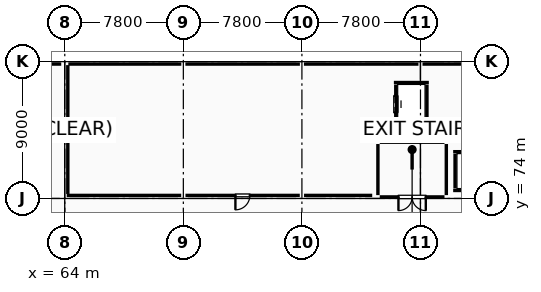
"""IFC4 building model, lengths in metres.
Left out: names, types, materials, properties, quantities, classifications, styles, units other than length and angle.
Written with IfcOpenShell. Run it as: python <this file> out.ifc"""

import sys

from ifc_helpers import new_model, si_unit, direction, frame, frame_2d, origin, origin_2d, place, context, subcontext, project, spatial, rectangle, hollow_rectangle, i_section, extrude, element, fill, save


model = new_model("IFC4")
c1 = context("Model", 3, precision=1e-05, world=origin(), true_north=direction((0.0, 1.0)))
c2 = subcontext(c1, "Body", "Model", "MODEL_VIEW")
j1 = project(units=[si_unit("LENGTHUNIT", "METRE"), si_unit("PLANEANGLEUNIT", "RADIAN")], contexts=[c1])
p1 = place(None, origin())
s1 = spatial("IfcSite", under=j1, at=p1, CompositionType="ELEMENT")
p2 = place(p1, origin())
s2 = spatial("IfcBuilding", under=s1, at=p2, CompositionType="ELEMENT")
p3 = place(p2, origin())
s3 = spatial("IfcBuildingStorey", under=s2, at=p3, CompositionType="ELEMENT", Elevation=0.0)
p4 = place(p3, frame((64.0, 74.0, 0.0), z_axis=(0.0, 0.0, 1.0), x_axis=(1.0, 0.0, 0.0)))
e1 = element("IfcColumn", 1, at=p4, inside=s3, PredefinedType="COLUMN", context=c2, shape_type="SweptSolid", body=[
    extrude(i_section(OverallWidth=0.25, OverallDepth=0.45, WebThickness=0.011, FlangeThickness=0.014, FilletRadius=0.015, at=origin_2d()), origin(), (0.0, 0.0, 1.0), 5.4),
])
p5 = place(p3, frame((64.0, 83.0, 0.0), z_axis=(0.0, 0.0, 1.0), x_axis=(1.0, 0.0, 0.0)))
e2 = element("IfcColumn", 2, at=p5, inside=s3, PredefinedType="COLUMN", context=c2, shape_type="SweptSolid", body=[
    extrude(hollow_rectangle(XDim=0.45, YDim=0.45, WallThickness=0.02, at=origin_2d()), origin(), (0.0, 0.0, 1.0), 5.4),
])
for number, where, z_axis, x_axis in (
    (3, (71.8, 74.0, 0.0), (0.0, 0.0, 1.0), (1.0, 0.0, 0.0)),
    (4, (71.8, 83.0, 0.0), (0.0, 0.0, 1.0), (1.0, 0.0, 0.0)),
    (5, (79.6, 74.0, 0.0), (0.0, 0.0, 1.0), (1.0, 0.0, 0.0)),
    (6, (79.6, 83.0, 0.0), (0.0, 0.0, 1.0), (1.0, 0.0, 0.0)),
    (7, (87.4, 83.0, 0.0), (0.0, 0.0, 1.0), (1.0, 0.0, 0.0)),
):
    element("IfcColumn", number, at=place(p3, frame(where, z_axis=z_axis, x_axis=x_axis)), inside=s3, PredefinedType="COLUMN", context=c2, shape_type="SweptSolid", body=[
        extrude(i_section(OverallWidth=0.25, OverallDepth=0.45, WebThickness=0.011, FlangeThickness=0.014, FilletRadius=0.015, at=origin_2d()), origin(), (0.0, 0.0, 1.0), 5.4),
    ])
p6 = place(p3, frame((62.804, 82.84, 0.0), z_axis=(0.0, 0.0, 1.0), x_axis=(1.0, 0.0, 0.0)))
e8 = element("IfcWall", 8, at=p6, inside=s3, PredefinedType="STANDARD", context=c2, shape_type="SweptSolid", body=[
    extrude(rectangle(XDim=0.963, YDim=0.28, at=frame_2d((0.481, 0.0))), origin(), (0.0, 0.0, 1.0), 5.12),
])
p7 = place(p3, frame((64.233, 82.84, 0.0), z_axis=(0.0, 0.0, 1.0), x_axis=(1.0, 0.0, 0.0)))
e9 = element("IfcWall", 9, at=p7, inside=s3, PredefinedType="STANDARD", context=c2, shape_type="SweptSolid", body=[
    extrude(rectangle(XDim=7.434, YDim=0.28, at=frame_2d((3.717, 0.0))), origin(), (0.0, 0.0, 1.0), 4.505),
])
p8 = place(p3, frame((71.933, 82.84, 0.0), z_axis=(0.0, 0.0, 1.0), x_axis=(1.0, 0.0, 0.0)))
e10 = element("IfcWall", 10, at=p8, inside=s3, PredefinedType="STANDARD", context=c2, shape_type="SweptSolid", body=[
    extrude(rectangle(XDim=7.534, YDim=0.28, at=frame_2d((3.767, 0.0))), origin(), (0.0, 0.0, 1.0), 4.555),
])
p9 = place(p3, frame((79.733, 82.84, 0.0), z_axis=(0.0, 0.0, 1.0), x_axis=(1.0, 0.0, 0.0)))
e11 = element("IfcWall", 11, at=p9, inside=s3, PredefinedType="STANDARD", context=c2, shape_type="SweptSolid", body=[
    extrude(rectangle(XDim=7.534, YDim=0.28, at=frame_2d((3.767, 0.0))), origin(), (0.0, 0.0, 1.0), 4.605),
])
p10 = place(p3, frame((87.533, 82.84, 0.0), z_axis=(0.0, 0.0, 1.0), x_axis=(1.0, 0.0, 0.0)))
e12 = element("IfcWall", 12, at=p10, inside=s3, PredefinedType="STANDARD", context=c2, shape_type="SweptSolid", body=[
    extrude(rectangle(XDim=5.863, YDim=0.28, at=frame_2d((2.932, 0.0))), origin(), (0.0, 0.0, 1.0), 5.12),
])
p11 = place(p3, frame((89.55, 74.525, 0.0), z_axis=(0.0, 0.0, 1.0), x_axis=(1.0, 0.0, 0.0)))
e13 = element("IfcWall", 13, at=p11, inside=s3, PredefinedType="STANDARD", context=c2, shape_type="SweptSolid", body=[
    extrude(rectangle(XDim=2.5, YDim=0.25, at=frame_2d((1.25, 0.0))), origin(), (0.0, 0.0, 1.0), 5.11),
])
p12 = place(p11, frame((0.65, 0.0, 0.0)))
e14 = element("IfcOpeningElement", 14, at=p12, cuts=e13, PredefinedType="OPENING", context=c2, shape_type="SweptSolid", body=[
    extrude(rectangle(XDim=1.2, YDim=2.05, at=frame_2d((0.6, 1.025))), frame((0.0, 0.135, 0.0), z_axis=(0.0, -1.0, 0.0), x_axis=(1.0, 0.0, 0.0)), (0.0, 0.0, 1.0), 0.27),
])
p13 = place(p3, frame((92.05, 77.075, 0.0), z_axis=(0.0, 0.0, 1.0), x_axis=(-1.0, 0.0, 0.0)))
e15 = element("IfcWall", 15, at=p13, inside=s3, PredefinedType="STANDARD", context=c2, shape_type="SweptSolid", body=[
    extrude(rectangle(XDim=2.5, YDim=0.25, at=frame_2d((1.25, 0.0))), origin(), (0.0, 0.0, 1.0), 5.11),
])
p14 = place(p3, frame((89.675, 76.94, 0.0), z_axis=(0.0, 0.0, 1.0), x_axis=(0.0, -1.0, 0.0)))
e16 = element("IfcWall", 16, at=p14, inside=s3, PredefinedType="STANDARD", context=c2, shape_type="SweptSolid", body=[
    extrude(rectangle(XDim=2.28, YDim=0.25, at=frame_2d((1.14, 0.0))), origin(), (0.0, 0.0, 1.0), 5.11),
])
for number, where, z_axis, x_axis in (
    (17, (85.65, 78.775, 0.0), (0.0, 0.0, 1.0), (1.0, 0.0, 0.0)),
    (18, (87.95, 81.625, 0.0), (0.0, 0.0, 1.0), (-1.0, 0.0, 0.0)),
):
    element("IfcWall", number, at=place(p3, frame(where, z_axis=z_axis, x_axis=x_axis)), inside=s3, PredefinedType="STANDARD", context=c2, shape_type="SweptSolid", body=[
        extrude(rectangle(XDim=2.3, YDim=0.25, at=frame_2d((1.15, 0.0))), origin(), (0.0, 0.0, 1.0), 5.11),
    ])
p15 = place(p3, frame((87.825, 78.91, 0.0), z_axis=(0.0, 0.0, 1.0), x_axis=(0.0, 1.0, 0.0)))
e19 = element("IfcWall", 19, at=p15, inside=s3, PredefinedType="STANDARD", context=c2, shape_type="SweptSolid", body=[
    extrude(rectangle(XDim=2.58, YDim=0.25, at=frame_2d((1.29, 0.0))), origin(), (0.0, 0.0, 1.0), 5.11),
])
p16 = place(p3, frame((85.775, 81.49, 0.0), z_axis=(0.0, 0.0, 1.0), x_axis=(0.0, -1.0, 0.0)))
e20 = element("IfcWall", 20, at=p16, inside=s3, PredefinedType="STANDARD", context=c2, shape_type="SweptSolid", body=[
    extrude(rectangle(XDim=2.58, YDim=0.25, at=frame_2d((1.29, 0.0))), origin(), (0.0, 0.0, 1.0), 5.11),
])
p17 = place(p16, frame((0.74, 0.0, 0.0)))
e21 = element("IfcOpeningElement", 21, at=p17, cuts=e20, PredefinedType="OPENING", context=c2, shape_type="SweptSolid", body=[
    extrude(rectangle(XDim=1.1, YDim=2.15, at=frame_2d((0.55, 1.075))), frame((0.0, 0.135, 0.0), z_axis=(0.0, -1.0, 0.0), x_axis=(1.0, 0.0, 0.0)), (0.0, 0.0, 1.0), 0.27),
])
p18 = place(p3, frame((84.6, 74.22, 0.0), z_axis=(0.0, 0.0, 1.0), x_axis=(0.0, 1.0, 0.0)))
e22 = element("IfcWall", 22, at=p18, inside=s3, PredefinedType="PARTITIONING", context=c2, shape_type="SweptSolid", body=[
    extrude(rectangle(XDim=3.36, YDim=0.2, at=frame_2d((1.68, 0.0))), origin(), (0.0, 0.0, 1.0), 5.11),
])
p19 = place(p3, frame((84.72, 77.7, 0.0), z_axis=(0.0, 0.0, 1.0), x_axis=(1.0, 0.0, 0.0)))
e23 = element("IfcWall", 23, at=p19, inside=s3, PredefinedType="PARTITIONING", context=c2, shape_type="SweptSolid", body=[
    extrude(rectangle(XDim=4.26, YDim=0.2, at=frame_2d((2.13, 0.0))), origin(), (0.0, 0.0, 1.0), 5.11),
])
p20 = place(p3, frame((89.1, 77.58, 0.0), z_axis=(0.0, 0.0, 1.0), x_axis=(0.0, -1.0, 0.0)))
e24 = element("IfcWall", 24, at=p20, inside=s3, PredefinedType="PARTITIONING", context=c2, shape_type="SweptSolid", body=[
    extrude(rectangle(XDim=3.36, YDim=0.2, at=frame_2d((1.68, 0.0))), origin(), (0.0, 0.0, 1.0), 5.11),
])
p21 = place(p3, frame((88.98, 74.1, 0.0), z_axis=(0.0, 0.0, 1.0), x_axis=(-1.0, 0.0, 0.0)))
e25 = element("IfcWall", 25, at=p21, inside=s3, PredefinedType="PARTITIONING", context=c2, shape_type="SweptSolid", body=[
    extrude(rectangle(XDim=4.26, YDim=0.2, at=frame_2d((2.13, 0.0))), origin(), (0.0, 0.0, 1.0), 5.11),
])
p22 = place(p21, frame((1.23, 0.0, 0.0)))
e26 = element("IfcOpeningElement", 26, at=p22, cuts=e25, PredefinedType="OPENING", context=c2, shape_type="SweptSolid", body=[
    extrude(rectangle(XDim=1.8, YDim=2.15, at=frame_2d((0.9, 1.075))), frame((0.0, 0.11, 0.0), z_axis=(0.0, -1.0, 0.0), x_axis=(1.0, 0.0, 0.0)), (0.0, 0.0, 1.0), 0.22),
])
p23 = place(p3, frame((64.2, 74.295, 0.0), z_axis=(0.0, 0.0, 1.0), x_axis=(0.0, 1.0, 0.0)))
e27 = element("IfcWall", 27, at=p23, inside=s3, PredefinedType="PARTITIONING", context=c2, shape_type="SweptSolid", body=[
    extrude(rectangle(XDim=8.476, YDim=0.15, at=frame_2d((4.238, 0.0))), origin(), (0.0, 0.0, 1.0), 4.1),
])
p24 = place(p3, frame((84.225, 74.2, 0.0), z_axis=(0.0, 0.0, 1.0), x_axis=(-1.0, 0.0, 0.0)))
e28 = element("IfcWall", 28, at=p24, inside=s3, PredefinedType="PARTITIONING", context=c2, shape_type="SweptSolid", body=[
    extrude(rectangle(XDim=4.485, YDim=0.15, at=frame_2d((2.243, 0.0))), origin(), (0.0, 0.0, 1.0), 5.11),
])
p25 = place(p3, frame((79.46, 74.2, 0.0), z_axis=(0.0, 0.0, 1.0), x_axis=(-1.0, 0.0, 0.0)))
e29 = element("IfcWall", 29, at=p25, inside=s3, PredefinedType="PARTITIONING", context=c2, shape_type="SweptSolid", body=[
    extrude(rectangle(XDim=7.52, YDim=0.15, at=frame_2d((3.76, 0.0))), origin(), (0.0, 0.0, 1.0), 4.75),
])
p26 = place(p25, frame((3.285, 0.0, 0.0)))
e30 = element("IfcOpeningElement", 30, at=p26, cuts=e29, PredefinedType="OPENING", context=c2, shape_type="SweptSolid", body=[
    extrude(rectangle(XDim=0.95, YDim=2.15, at=frame_2d((0.475, 1.075))), frame((0.0, 0.085, 0.0), z_axis=(0.0, -1.0, 0.0), x_axis=(1.0, 0.0, 0.0)), (0.0, 0.0, 1.0), 0.17),
])
p27 = place(p3, frame((71.66, 74.2, 0.0), z_axis=(0.0, 0.0, 1.0), x_axis=(-1.0, 0.0, 0.0)))
e31 = element("IfcWall", 31, at=p27, inside=s3, PredefinedType="PARTITIONING", context=c2, shape_type="SweptSolid", body=[
    extrude(rectangle(XDim=7.531, YDim=0.15, at=frame_2d((3.766, 0.0))), origin(), (0.0, 0.0, 1.0), 4.7),
])
p28 = place(p17, origin())
e32 = element("IfcDoor", 32, at=p28, inside=s3, OperationType="DOUBLE_DOOR_SLIDING", PredefinedType="DOOR", context=c2, shape_type="SweptSolid", body=[
    extrude(rectangle(XDim=1.1, YDim=2.15, at=frame_2d((0.55, 1.075))), frame((0.0, 0.025, 0.0), z_axis=(0.0, -1.0, 0.0), x_axis=(1.0, 0.0, 0.0)), (0.0, 0.0, 1.0), 0.05),
])
fill(e21, e32)
p29 = place(p22, origin())
e33 = element("IfcDoor", 33, at=p29, inside=s3, OperationType="DOUBLE_DOOR_SINGLE_SWING", PredefinedType="DOOR", context=c2, shape_type="SweptSolid", body=[
    extrude(rectangle(XDim=1.8, YDim=2.15, at=frame_2d((0.9, 1.075))), frame((0.0, 0.025, 0.0), z_axis=(0.0, -1.0, 0.0), x_axis=(1.0, 0.0, 0.0)), (0.0, 0.0, 1.0), 0.05),
])
fill(e26, e33)
p30 = place(p26, origin())
e34 = element("IfcDoor", 34, at=p30, inside=s3, OperationType="SINGLE_SWING_RIGHT", PredefinedType="DOOR", context=c2, shape_type="SweptSolid", body=[
    extrude(rectangle(XDim=0.95, YDim=2.15, at=frame_2d((0.475, 1.075))), frame((0.0, 0.025, 0.0), z_axis=(0.0, -1.0, 0.0), x_axis=(1.0, 0.0, 0.0)), (0.0, 0.0, 1.0), 0.05),
])
fill(e30, e34)
save(model, sys.argv[1])
